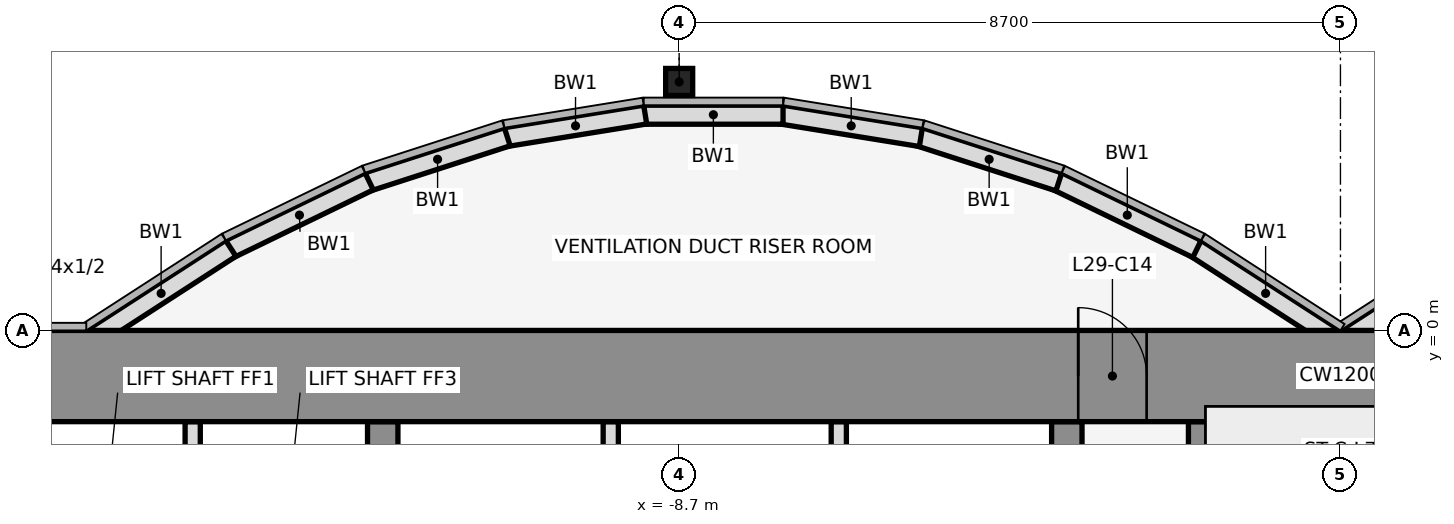
"""IFC4 building model, lengths in metres.
Left out: names, types, materials, properties, quantities, classifications, styles, units other than length and angle.
Written with IfcOpenShell. Run it as: python <this file> out.ifc"""

import sys

from ifc_helpers import new_model, si_unit, direction, frame, frame_2d, origin, origin_2d, place, context, subcontext, project, spatial, rectangle, hollow_rectangle, extrude, element, fill, save


model = new_model("IFC4")
c1 = context("Model", 3, precision=1e-05, world=origin(), true_north=direction((0.0, 1.0)))
c2 = subcontext(c1, "Body", "Model", "MODEL_VIEW")
j1 = project(units=[si_unit("LENGTHUNIT", "METRE"), si_unit("PLANEANGLEUNIT", "RADIAN")], contexts=[c1])
p1 = place(None, origin())
s1 = spatial("IfcSite", under=j1, at=p1, CompositionType="ELEMENT")
p2 = place(p1, origin())
s2 = spatial("IfcBuilding", under=s1, at=p2, CompositionType="ELEMENT")
p3 = place(p2, frame((0.0, 0.0, 135.0)))
s3 = spatial("IfcBuildingStorey", under=s2, at=p3, CompositionType="ELEMENT", Elevation=135.0)
p4 = place(p3, frame((-8.7, 3.269, 0.0), z_axis=(0.0, 0.0, 1.0), x_axis=(1.0, 0.0, 0.0)))
e1 = element("IfcColumn", 1, at=p4, inside=s3, PredefinedType="COLUMN", context=c2, shape_type="SweptSolid", body=[
    extrude(hollow_rectangle(XDim=0.356, YDim=0.356, WallThickness=0.012, at=origin_2d()), origin(), (0.0, 0.0, 1.0), 5.4),
])
for number, where, z_axis, x_axis in (
    (2, (1.901, 1.08, 0.0), (0.0, 0.0, 1.0), (-0.84, -0.543, 0.0)),
    (3, (-0.068, -0.105, 0.0), (0.0, 0.0, 1.0), (-0.84, 0.543, 0.0)),
):
    element("IfcWall", number, at=place(p3, frame(where, z_axis=z_axis, x_axis=x_axis)), inside=s3, PredefinedType="STANDARD", context=c2, shape_type="SweptSolid", body=[
        extrude(rectangle(XDim=2.183, YDim=0.25, at=frame_2d((1.091, 0.0))), origin(), (0.0, 0.0, 1.0), 5.25),
    ])
p5 = place(p3, frame((-1.888, 1.073, 0.0), z_axis=(0.0, 0.0, 1.0), x_axis=(-0.89982408427, 0.436252928206, 0.0)))
e4 = element("IfcWall", 4, at=p5, inside=s3, PredefinedType="STANDARD", context=c2, shape_type="SweptSolid", body=[
    extrude(rectangle(XDim=2.038, YDim=0.25, at=frame_2d((1.019, 0.0))), origin(), (0.0, 0.0, 1.0), 5.25),
])
p6 = place(p3, frame((-3.705, 1.955, 0.0), z_axis=(0.0, 0.0, 1.0), x_axis=(-0.951495806175, 0.307661714928, 0.0)))
e5 = element("IfcWall", 5, at=p6, inside=s3, PredefinedType="STANDARD", context=c2, shape_type="SweptSolid", body=[
    extrude(rectangle(XDim=1.927, YDim=0.25, at=frame_2d((0.963, 0.0))), origin(), (0.0, 0.0, 1.0), 5.25),
])
p7 = place(p3, frame((-5.52, 2.543, 0.0), z_axis=(0.0, 0.0, 1.0), x_axis=(-0.987181718931, 0.159600293885, 0.0)))
e6 = element("IfcWall", 6, at=p7, inside=s3, PredefinedType="STANDARD", context=c2, shape_type="SweptSolid", body=[
    extrude(rectangle(XDim=1.857, YDim=0.25, at=frame_2d((0.929, 0.0))), origin(), (0.0, 0.0, 1.0), 5.25),
])
p8 = place(p3, frame((-7.333, 2.838, 0.0), z_axis=(0.0, 0.0, 1.0), x_axis=(-1.0, 0.0, 0.0)))
e7 = element("IfcWall", 7, at=p8, inside=s3, PredefinedType="STANDARD", context=c2, shape_type="SweptSolid", body=[
    extrude(rectangle(XDim=1.833, YDim=0.25, at=frame_2d((0.917, 0.0))), origin(), (0.0, 0.0, 1.0), 5.25),
])
p9 = place(p3, frame((-9.147, 2.84, 0.0), z_axis=(0.0, 0.0, 1.0), x_axis=(-0.987181718931, -0.159600293885, 0.0)))
e8 = element("IfcWall", 8, at=p9, inside=s3, PredefinedType="STANDARD", context=c2, shape_type="SweptSolid", body=[
    extrude(rectangle(XDim=1.857, YDim=0.25, at=frame_2d((0.929, 0.0))), origin(), (0.0, 0.0, 1.0), 5.25),
])
p10 = place(p3, frame((-10.962, 2.548, 0.0), z_axis=(0.0, 0.0, 1.0), x_axis=(-0.951495806175, -0.307661714928, 0.0)))
e9 = element("IfcWall", 9, at=p10, inside=s3, PredefinedType="STANDARD", context=c2, shape_type="SweptSolid", body=[
    extrude(rectangle(XDim=1.927, YDim=0.25, at=frame_2d((0.963, 0.0))), origin(), (0.0, 0.0, 1.0), 5.25),
])
p11 = place(p3, frame((-12.779, 1.962, 0.0), z_axis=(0.0, 0.0, 1.0), x_axis=(-0.89982408427, -0.436252928206, 0.0)))
e10 = element("IfcWall", 10, at=p11, inside=s3, PredefinedType="STANDARD", context=c2, shape_type="SweptSolid", body=[
    extrude(rectangle(XDim=2.038, YDim=0.25, at=frame_2d((1.019, 0.0))), origin(), (0.0, 0.0, 1.0), 5.25),
])
p12 = place(p3, frame((-14.599, 1.08, 0.0), z_axis=(0.0, 0.0, 1.0), x_axis=(-0.83981312244, -0.542875602121, 0.0)))
e11 = element("IfcWall", 11, at=p12, inside=s3, PredefinedType="STANDARD", context=c2, shape_type="SweptSolid", body=[
    extrude(rectangle(XDim=2.183, YDim=0.25, at=frame_2d((1.091, 0.0))), origin(), (0.0, 0.0, 1.0), 5.25),
])
p13 = place(p3, frame((-15.1, -4.6, 0.0), z_axis=(0.0, 0.0, 1.0), x_axis=(0.0, 1.0, 0.0)))
e12 = element("IfcWall", 12, at=p13, inside=s3, PredefinedType="PARTITIONING", context=c2, shape_type="SweptSolid", body=[
    extrude(rectangle(XDim=3.4, YDim=0.2, at=frame_2d((1.7, 0.0))), origin(), (0.0, 0.0, 1.0), 4.24),
])
p14 = place(p3, frame((-12.6, -11.8, 0.0), z_axis=(0.0, 0.0, 1.0), x_axis=(0.0, 1.0, 0.0)))
e13 = element("IfcWall", 13, at=p14, inside=s3, PredefinedType="SHEAR", context=c2, shape_type="SweptSolid", body=[
    extrude(rectangle(XDim=10.6, YDim=0.4, at=frame_2d((5.3, 0.0))), origin(), (0.0, 0.0, 1.0), 5.4),
])
p15 = place(p14, frame((1.25, 0.0, 0.0)))
e14 = element("IfcOpeningElement", 14, at=p15, cuts=e13, PredefinedType="OPENING", context=c2, shape_type="SweptSolid", body=[
    extrude(rectangle(XDim=1.2, YDim=2.1, at=frame_2d((0.6, 1.05))), frame((0.0, 0.212, 0.0), z_axis=(0.0, -1.0, 0.0), x_axis=(1.0, 0.0, 0.0)), (0.0, 0.0, 1.0), 0.424),
])
p16 = place(p14, frame((4.75, 0.0, 0.0)))
e15 = element("IfcOpeningElement", 15, at=p16, cuts=e13, PredefinedType="OPENING", context=c2, shape_type="SweptSolid", body=[
    extrude(rectangle(XDim=1.1, YDim=2.1, at=frame_2d((0.55, 1.05))), frame((0.0, 0.212, 0.0), z_axis=(0.0, -1.0, 0.0), x_axis=(1.0, 0.0, 0.0)), (0.0, 0.0, 1.0), 0.424),
])
for number, where, z_axis, x_axis in (
    (16, (-9.6, -4.6, 0.0), (0.0, 0.0, 1.0), (0.0, 1.0, 0.0)),
    (17, (-6.6, -4.6, 0.0), (0.0, 0.0, 1.0), (0.0, 1.0, 0.0)),
):
    element("IfcWall", number, at=place(p3, frame(where, z_axis=z_axis, x_axis=x_axis)), inside=s3, PredefinedType="PARTITIONING", context=c2, shape_type="SweptSolid", body=[
        extrude(rectangle(XDim=3.4, YDim=0.2, at=frame_2d((1.7, 0.0))), origin(), (0.0, 0.0, 1.0), 4.24),
    ])
p17 = place(p3, frame((-3.6, -11.8, 0.0), z_axis=(0.0, 0.0, 1.0), x_axis=(0.0, 1.0, 0.0)))
e18 = element("IfcWall", 18, at=p17, inside=s3, PredefinedType="SHEAR", context=c2, shape_type="SweptSolid", body=[
    extrude(rectangle(XDim=10.6, YDim=0.4, at=frame_2d((5.3, 0.0))), origin(), (0.0, 0.0, 1.0), 5.4),
])
p18 = place(p17, frame((4.85, 0.0, 0.0)))
e19 = element("IfcOpeningElement", 19, at=p18, cuts=e18, PredefinedType="OPENING", context=c2, shape_type="SweptSolid", body=[
    extrude(rectangle(XDim=0.9, YDim=2.1, at=frame_2d((0.45, 1.05))), frame((0.0, 0.212, 0.0), z_axis=(0.0, -1.0, 0.0), x_axis=(1.0, 0.0, 0.0)), (0.0, 0.0, 1.0), 0.424),
])
p19 = place(p3, frame((-1.8, -11.8, 0.0), z_axis=(0.0, 0.0, 1.0), x_axis=(0.0, 1.0, 0.0)))
e20 = element("IfcWall", 20, at=p19, inside=s3, PredefinedType="SHEAR", context=c2, shape_type="SweptSolid", body=[
    extrude(rectangle(XDim=10.6, YDim=0.4, at=frame_2d((5.3, 0.0))), origin(), (0.0, 0.0, 1.0), 5.4),
])
p20 = place(p3, frame((-22.0, -0.6, 0.0), z_axis=(0.0, 0.0, 1.0), x_axis=(1.0, 0.0, 0.0)))
e21 = element("IfcWall", 21, at=p20, inside=s3, PredefinedType="SHEAR", context=c2, shape_type="SweptSolid", body=[
    extrude(rectangle(XDim=44.0, YDim=1.2, at=frame_2d((22.0, 0.0))), origin(), (0.0, 0.0, 1.0), 5.4),
])
p21 = place(p20, frame((18.55, 0.0, 0.0)))
e22 = element("IfcOpeningElement", 22, at=p21, cuts=e21, PredefinedType="OPENING", context=c2, shape_type="SweptSolid", body=[
    extrude(rectangle(XDim=0.9, YDim=2.1, at=frame_2d((0.45, 1.05))), frame((0.0, 0.612, 0.0), z_axis=(0.0, -1.0, 0.0), x_axis=(1.0, 0.0, 0.0)), (0.0, 0.0, 1.0), 1.224),
])
p22 = place(p20, frame((24.55, 0.0, 0.0)))
e23 = element("IfcOpeningElement", 23, at=p22, cuts=e21, PredefinedType="OPENING", context=c2, shape_type="SweptSolid", body=[
    extrude(rectangle(XDim=0.9, YDim=2.1, at=frame_2d((0.45, 1.05))), frame((0.0, 0.612, 0.0), z_axis=(0.0, -1.0, 0.0), x_axis=(1.0, 0.0, 0.0)), (0.0, 0.0, 1.0), 1.224),
])
p23 = place(p21, origin())
e24 = element("IfcDoor", 24, at=p23, inside=s3, OperationType="SINGLE_SWING_LEFT", PredefinedType="DOOR", context=c2, shape_type="SweptSolid", body=[
    extrude(rectangle(XDim=0.9, YDim=2.1, at=frame_2d((0.45, 1.05))), frame((0.0, 0.025, 0.0), z_axis=(0.0, -1.0, 0.0), x_axis=(1.0, 0.0, 0.0)), (0.0, 0.0, 1.0), 0.05),
])
fill(e22, e24)
save(model, sys.argv[1])
